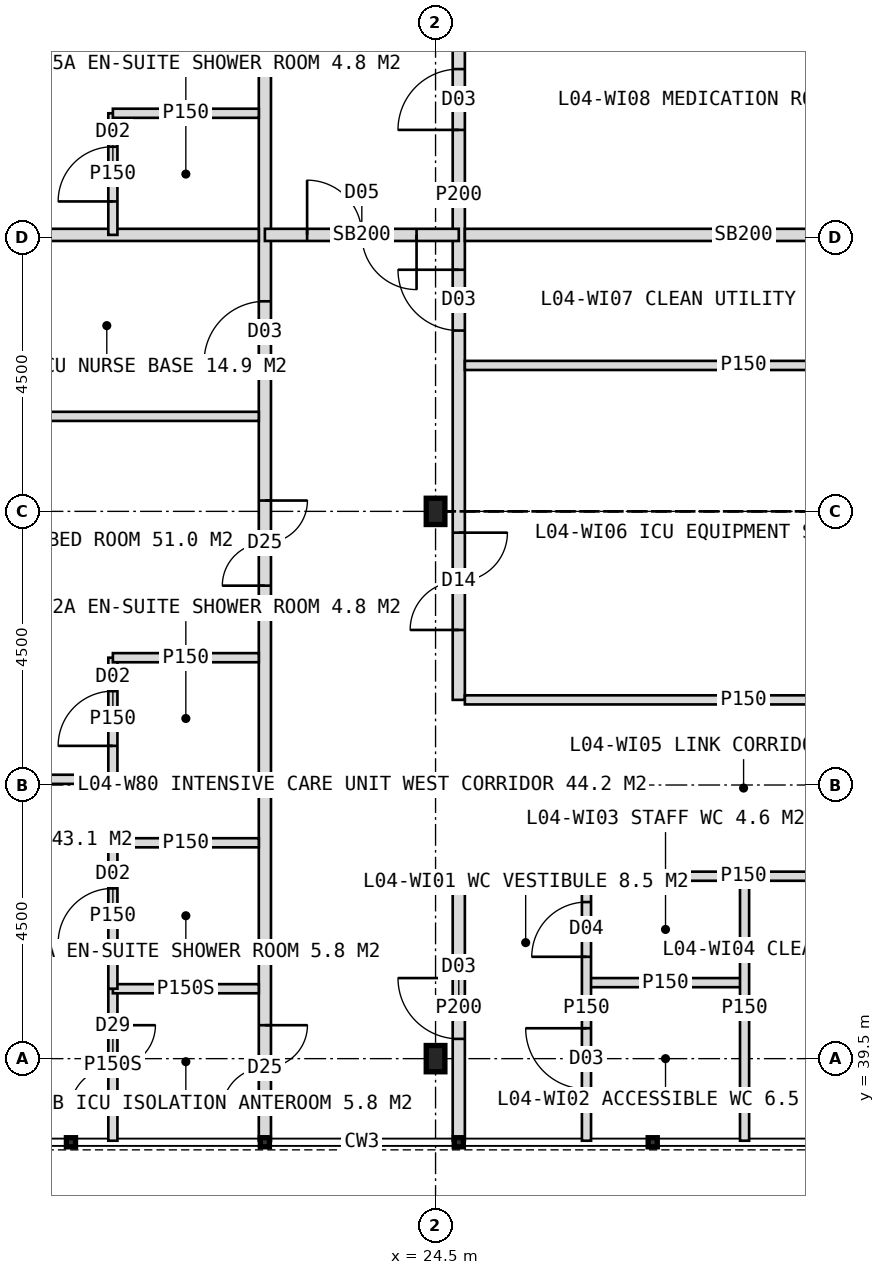
"""IFC4 building model, lengths in metres.
Left out: names, types, materials, properties, quantities, classifications, styles, units other than length and angle.
Written with IfcOpenShell. Run it as: python <this file> out.ifc"""

import sys

from ifc_helpers import new_model, si_unit, direction, frame, frame_2d, origin, origin_2d, place, context, subcontext, project, spatial, rectangle, i_section, extrude, element, fill, save


model = new_model("IFC4")
c1 = context("Model", 3, precision=1e-05, world=origin(), true_north=direction((0.0, 1.0)))
c2 = subcontext(c1, "Body", "Model", "MODEL_VIEW")
j1 = project(units=[si_unit("LENGTHUNIT", "METRE"), si_unit("PLANEANGLEUNIT", "RADIAN")], contexts=[c1])
p1 = place(None, origin())
s1 = spatial("IfcSite", under=j1, at=p1, CompositionType="ELEMENT")
p2 = place(p1, origin())
s2 = spatial("IfcBuilding", under=s1, at=p2, CompositionType="ELEMENT")
p3 = place(p2, frame((0.0, 0.0, 21.0)))
s3 = spatial("IfcBuildingStorey", under=s2, at=p3, CompositionType="ELEMENT", Elevation=21.0)
for number, where, z_axis, x_axis in (
    (1, (24.5, 39.5, 0.0), (0.0, 0.0, 1.0), (1.0, 0.0, 0.0)),
    (2, (24.5, 48.5, 0.0), (0.0, 0.0, 1.0), (1.0, 0.0, 0.0)),
):
    element("IfcColumn", number, at=place(p3, frame(where, z_axis=z_axis, x_axis=x_axis)), inside=s3, PredefinedType="COLUMN", context=c2, shape_type="SweptSolid", body=[
        extrude(i_section(OverallWidth=0.307, OverallDepth=0.432, WebThickness=0.021, FlangeThickness=0.04, FilletRadius=0.027, at=origin_2d()), origin(), (0.0, 0.0, 1.0), 5.0),
    ])
p4 = place(p3, frame((21.693, 38.15, 0.0), z_axis=(0.0, 0.0, 1.0), x_axis=(0.0, 1.0, 0.0)))
e3 = element("IfcWall", 3, at=p4, inside=s3, PredefinedType="PARTITIONING", context=c2, shape_type="SweptSolid", body=[
    extrude(rectangle(XDim=47.7, YDim=0.2, at=frame_2d((23.85, 0.0))), origin(), (0.0, 0.0, 1.0), 4.7),
])
p5 = place(p4, frame((45.7, 0.0, 0.0)))
e4 = element("IfcOpeningElement", 4, at=p5, cuts=e3, PredefinedType="OPENING", context=c2, shape_type="SweptSolid", body=[
    extrude(rectangle(XDim=1.2, YDim=2.1, at=frame_2d((0.6, 1.05))), frame((0.0, 0.11, 0.0), z_axis=(0.0, -1.0, 0.0), x_axis=(1.0, 0.0, 0.0)), (0.0, 0.0, 1.0), 0.22),
])
p6 = place(p4, frame((36.244, 0.0, 0.0)))
e5 = element("IfcOpeningElement", 5, at=p6, cuts=e3, PredefinedType="OPENING", context=c2, shape_type="SweptSolid", body=[
    extrude(rectangle(XDim=1.0, YDim=2.1, at=frame_2d((0.5, 1.05))), frame((0.0, 0.11, 0.0), z_axis=(0.0, -1.0, 0.0), x_axis=(1.0, 0.0, 0.0)), (0.0, 0.0, 1.0), 0.22),
])
p7 = place(p4, frame((0.5, 0.0, 0.0)))
e6 = element("IfcOpeningElement", 6, at=p7, cuts=e3, PredefinedType="OPENING", context=c2, shape_type="SweptSolid", body=[
    extrude(rectangle(XDim=1.4, YDim=2.2, at=frame_2d((0.7, 1.1))), frame((0.0, 0.11, 0.0), z_axis=(0.0, -1.0, 0.0), x_axis=(1.0, 0.0, 0.0)), (0.0, 0.0, 1.0), 0.22),
])
p8 = place(p4, frame((30.219, 0.0, 0.0)))
e7 = element("IfcOpeningElement", 7, at=p8, cuts=e3, PredefinedType="OPENING", context=c2, shape_type="SweptSolid", body=[
    extrude(rectangle(XDim=1.4, YDim=2.2, at=frame_2d((0.7, 1.1))), frame((0.0, 0.11, 0.0), z_axis=(0.0, -1.0, 0.0), x_axis=(1.0, 0.0, 0.0)), (0.0, 0.0, 1.0), 0.22),
])
p9 = place(p4, frame((9.128, 0.0, 0.0)))
e8 = element("IfcOpeningElement", 8, at=p9, cuts=e3, PredefinedType="OPENING", context=c2, shape_type="SweptSolid", body=[
    extrude(rectangle(XDim=1.4, YDim=2.2, at=frame_2d((0.7, 1.1))), frame((0.0, 0.11, 0.0), z_axis=(0.0, -1.0, 0.0), x_axis=(1.0, 0.0, 0.0)), (0.0, 0.0, 1.0), 0.22),
])
p10 = place(p4, frame((12.805, 0.0, 0.0)))
e9 = element("IfcOpeningElement", 9, at=p10, cuts=e3, PredefinedType="OPENING", context=c2, shape_type="SweptSolid", body=[
    extrude(rectangle(XDim=1.0, YDim=2.1, at=frame_2d((0.5, 1.05))), frame((0.0, 0.11, 0.0), z_axis=(0.0, -1.0, 0.0), x_axis=(1.0, 0.0, 0.0)), (0.0, 0.0, 1.0), 0.22),
])
p11 = place(p4, frame((18.081, 0.0, 0.0)))
e10 = element("IfcOpeningElement", 10, at=p11, cuts=e3, PredefinedType="OPENING", context=c2, shape_type="SweptSolid", body=[
    extrude(rectangle(XDim=1.4, YDim=2.2, at=frame_2d((0.7, 1.1))), frame((0.0, 0.11, 0.0), z_axis=(0.0, -1.0, 0.0), x_axis=(1.0, 0.0, 0.0)), (0.0, 0.0, 1.0), 0.22),
])
p12 = place(p4, frame((24.05, 0.0, 0.0)))
e11 = element("IfcOpeningElement", 11, at=p12, cuts=e3, PredefinedType="OPENING", context=c2, shape_type="SweptSolid", body=[
    extrude(rectangle(XDim=1.4, YDim=2.2, at=frame_2d((0.7, 1.1))), frame((0.0, 0.11, 0.0), z_axis=(0.0, -1.0, 0.0), x_axis=(1.0, 0.0, 0.0)), (0.0, 0.0, 1.0), 0.22),
])
p13 = place(p4, frame((27.727, 0.0, 0.0)))
e12 = element("IfcOpeningElement", 12, at=p13, cuts=e3, PredefinedType="OPENING", context=c2, shape_type="SweptSolid", body=[
    extrude(rectangle(XDim=1.0, YDim=2.1, at=frame_2d((0.5, 1.05))), frame((0.0, 0.11, 0.0), z_axis=(0.0, -1.0, 0.0), x_axis=(1.0, 0.0, 0.0)), (0.0, 0.0, 1.0), 0.22),
])
p14 = place(p3, frame((24.882, 38.15, 0.0), z_axis=(0.0, 0.0, 1.0), x_axis=(0.0, 1.0, 0.0)))
e13 = element("IfcWall", 13, at=p14, inside=s3, PredefinedType="PARTITIONING", context=c2, shape_type="SweptSolid", body=[
    extrude(rectangle(XDim=4.35, YDim=0.2, at=frame_2d((2.175, 0.0))), origin(), (0.0, 0.0, 1.0), 4.7),
])
p15 = place(p14, frame((1.675, 0.0, 0.0)))
e14 = element("IfcOpeningElement", 14, at=p15, cuts=e13, PredefinedType="OPENING", context=c2, shape_type="SweptSolid", body=[
    extrude(rectangle(XDim=1.0, YDim=2.1, at=frame_2d((0.5, 1.05))), frame((0.0, 0.11, 0.0), z_axis=(0.0, -1.0, 0.0), x_axis=(1.0, 0.0, 0.0)), (0.0, 0.0, 1.0), 0.22),
])
p16 = place(p3, frame((24.882, 45.4, 0.0), z_axis=(0.0, 0.0, 1.0), x_axis=(0.0, 1.0, 0.0)))
e15 = element("IfcWall", 15, at=p16, inside=s3, PredefinedType="PARTITIONING", context=c2, shape_type="SweptSolid", body=[
    extrude(rectangle(XDim=16.6, YDim=0.2, at=frame_2d((8.3, 0.0))), origin(), (0.0, 0.0, 1.0), 4.7),
])
p17 = place(p16, frame((1.15, 0.0, 0.0)))
e16 = element("IfcOpeningElement", 16, at=p17, cuts=e15, PredefinedType="OPENING", context=c2, shape_type="SweptSolid", body=[
    extrude(rectangle(XDim=1.6, YDim=2.2, at=frame_2d((0.8, 1.1))), frame((0.0, 0.11, 0.0), z_axis=(0.0, -1.0, 0.0), x_axis=(1.0, 0.0, 0.0)), (0.0, 0.0, 1.0), 0.22),
])
p18 = place(p16, frame((6.073, 0.0, 0.0)))
e17 = element("IfcOpeningElement", 17, at=p18, cuts=e15, PredefinedType="OPENING", context=c2, shape_type="SweptSolid", body=[
    extrude(rectangle(XDim=1.0, YDim=2.1, at=frame_2d((0.5, 1.05))), frame((0.0, 0.11, 0.0), z_axis=(0.0, -1.0, 0.0), x_axis=(1.0, 0.0, 0.0)), (0.0, 0.0, 1.0), 0.22),
])
p19 = place(p16, frame((9.374, 0.0, 0.0)))
e18 = element("IfcOpeningElement", 18, at=p19, cuts=e15, PredefinedType="OPENING", context=c2, shape_type="SweptSolid", body=[
    extrude(rectangle(XDim=1.0, YDim=2.1, at=frame_2d((0.5, 1.05))), frame((0.0, 0.11, 0.0), z_axis=(0.0, -1.0, 0.0), x_axis=(1.0, 0.0, 0.0)), (0.0, 0.0, 1.0), 0.22),
])
p20 = place(p16, frame((13.85, 0.0, 0.0)))
e19 = element("IfcOpeningElement", 19, at=p20, cuts=e15, PredefinedType="OPENING", context=c2, shape_type="SweptSolid", body=[
    extrude(rectangle(XDim=1.0, YDim=2.1, at=frame_2d((0.5, 1.05))), frame((0.0, 0.11, 0.0), z_axis=(0.0, -1.0, 0.0), x_axis=(1.0, 0.0, 0.0)), (0.0, 0.0, 1.0), 0.22),
])
p21 = place(p3, frame((21.693, 53.047, 0.0), z_axis=(0.0, 0.0, 1.0), x_axis=(1.0, 0.0, 0.0)))
e20 = element("IfcWall", 20, at=p21, inside=s3, PredefinedType="SOLIDWALL", context=c2, shape_type="SweptSolid", body=[
    extrude(rectangle(XDim=3.189, YDim=0.2, at=frame_2d((1.594, 0.0))), origin(), (0.0, 0.0, 1.0), 4.7),
])
p22 = place(p21, frame((0.695, 0.0, 0.0)))
e21 = element("IfcOpeningElement", 21, at=p22, cuts=e20, PredefinedType="OPENING", context=c2, shape_type="SweptSolid", body=[
    extrude(rectangle(XDim=1.8, YDim=2.2, at=frame_2d((0.9, 1.1))), frame((0.0, 0.11, 0.0), z_axis=(0.0, -1.0, 0.0), x_axis=(1.0, 0.0, 0.0)), (0.0, 0.0, 1.0), 0.22),
])
for number, where, z_axis, x_axis in (
    (22, (12.15, 44.094, 0.0), (0.0, 0.0, 1.0), (1.0, 0.0, 0.0)),
    (23, (12.15, 50.062, 0.0), (0.0, 0.0, 1.0), (1.0, 0.0, 0.0)),
):
    element("IfcWall", number, at=place(p3, frame(where, z_axis=z_axis, x_axis=x_axis)), inside=s3, PredefinedType="PARTITIONING", context=c2, shape_type="SweptSolid", body=[
        extrude(rectangle(XDim=9.443, YDim=0.15, at=frame_2d((4.722, 0.0))), origin(), (0.0, 0.0, 1.0), 4.7),
    ])
p23 = place(p3, frame((12.15, 53.047, 0.0), z_axis=(0.0, 0.0, 1.0), x_axis=(1.0, 0.0, 0.0)))
e24 = element("IfcWall", 24, at=p23, inside=s3, PredefinedType="SOLIDWALL", context=c2, shape_type="SweptSolid", body=[
    extrude(rectangle(XDim=9.443, YDim=0.2, at=frame_2d((4.722, 0.0))), origin(), (0.0, 0.0, 1.0), 4.7),
])
p24 = place(p3, frame((19.193, 38.15, 0.0), z_axis=(0.0, 0.0, 1.0), x_axis=(0.0, 1.0, 0.0)))
e25 = element("IfcWall", 25, at=p24, inside=s3, PredefinedType="PARTITIONING", context=c2, shape_type="SweptSolid", body=[
    extrude(rectangle(XDim=2.5, YDim=0.15, at=frame_2d((1.25, 0.0))), origin(), (0.0, 0.0, 1.0), 4.7),
])
p25 = place(p24, frame((0.5, 0.0, 0.0)))
e26 = element("IfcOpeningElement", 26, at=p25, cuts=e25, PredefinedType="OPENING", context=c2, shape_type="SweptSolid", body=[
    extrude(rectangle(XDim=1.4, YDim=2.2, at=frame_2d((0.7, 1.1))), frame((0.0, 0.085, 0.0), z_axis=(0.0, -1.0, 0.0), x_axis=(1.0, 0.0, 0.0)), (0.0, 0.0, 1.0), 0.17),
])
p26 = place(p3, frame((21.593, 40.65, 0.0), z_axis=(0.0, 0.0, 1.0), x_axis=(-1.0, 0.0, 0.0)))
e27 = element("IfcWall", 27, at=p26, inside=s3, PredefinedType="PARTITIONING", context=c2, shape_type="SweptSolid", body=[
    extrude(rectangle(XDim=2.4, YDim=0.15, at=frame_2d((1.2, 0.0))), origin(), (0.0, 0.0, 1.0), 4.7),
])
p27 = place(p3, frame((19.193, 40.65, 0.0), z_axis=(0.0, 0.0, 1.0), x_axis=(0.0, 1.0, 0.0)))
e28 = element("IfcWall", 28, at=p27, inside=s3, PredefinedType="PARTITIONING", context=c2, shape_type="SweptSolid", body=[
    extrude(rectangle(XDim=2.4, YDim=0.15, at=frame_2d((1.2, 0.0))), origin(), (0.0, 0.0, 1.0), 4.7),
])
p28 = place(p27, frame((0.75, 0.0, 0.0)))
e29 = element("IfcOpeningElement", 29, at=p28, cuts=e28, PredefinedType="OPENING", context=c2, shape_type="SweptSolid", body=[
    extrude(rectangle(XDim=0.9, YDim=2.1, at=frame_2d((0.45, 1.05))), frame((0.0, 0.085, 0.0), z_axis=(0.0, -1.0, 0.0), x_axis=(1.0, 0.0, 0.0)), (0.0, 0.0, 1.0), 0.17),
])
p29 = place(p3, frame((21.593, 43.05, 0.0), z_axis=(0.0, 0.0, 1.0), x_axis=(-1.0, 0.0, 0.0)))
e30 = element("IfcWall", 30, at=p29, inside=s3, PredefinedType="PARTITIONING", context=c2, shape_type="SweptSolid", body=[
    extrude(rectangle(XDim=2.4, YDim=0.15, at=frame_2d((1.2, 0.0))), origin(), (0.0, 0.0, 1.0), 4.7),
])
p30 = place(p3, frame((19.193, 44.094, 0.0), z_axis=(0.0, 0.0, 1.0), x_axis=(0.0, 1.0, 0.0)))
e31 = element("IfcWall", 31, at=p30, inside=s3, PredefinedType="PARTITIONING", context=c2, shape_type="SweptSolid", body=[
    extrude(rectangle(XDim=2.0, YDim=0.15, at=frame_2d((1.0, 0.0))), origin(), (0.0, 0.0, 1.0), 4.7),
])
p31 = place(p30, frame((0.55, 0.0, 0.0)))
e32 = element("IfcOpeningElement", 32, at=p31, cuts=e31, PredefinedType="OPENING", context=c2, shape_type="SweptSolid", body=[
    extrude(rectangle(XDim=0.9, YDim=2.1, at=frame_2d((0.45, 1.05))), frame((0.0, 0.085, 0.0), z_axis=(0.0, -1.0, 0.0), x_axis=(1.0, 0.0, 0.0)), (0.0, 0.0, 1.0), 0.17),
])
p32 = place(p3, frame((21.593, 46.094, 0.0), z_axis=(0.0, 0.0, 1.0), x_axis=(-1.0, 0.0, 0.0)))
e33 = element("IfcWall", 33, at=p32, inside=s3, PredefinedType="PARTITIONING", context=c2, shape_type="SweptSolid", body=[
    extrude(rectangle(XDim=2.4, YDim=0.15, at=frame_2d((1.2, 0.0))), origin(), (0.0, 0.0, 1.0), 4.7),
])
p33 = place(p3, frame((19.193, 53.047, 0.0), z_axis=(0.0, 0.0, 1.0), x_axis=(0.0, 1.0, 0.0)))
e34 = element("IfcWall", 34, at=p33, inside=s3, PredefinedType="PARTITIONING", context=c2, shape_type="SweptSolid", body=[
    extrude(rectangle(XDim=2.0, YDim=0.15, at=frame_2d((1.0, 0.0))), origin(), (0.0, 0.0, 1.0), 4.7),
])
p34 = place(p33, frame((0.55, 0.0, 0.0)))
e35 = element("IfcOpeningElement", 35, at=p34, cuts=e34, PredefinedType="OPENING", context=c2, shape_type="SweptSolid", body=[
    extrude(rectangle(XDim=0.9, YDim=2.1, at=frame_2d((0.45, 1.05))), frame((0.0, 0.085, 0.0), z_axis=(0.0, -1.0, 0.0), x_axis=(1.0, 0.0, 0.0)), (0.0, 0.0, 1.0), 0.17),
])
p35 = place(p3, frame((21.593, 55.047, 0.0), z_axis=(0.0, 0.0, 1.0), x_axis=(-1.0, 0.0, 0.0)))
e36 = element("IfcWall", 36, at=p35, inside=s3, PredefinedType="PARTITIONING", context=c2, shape_type="SweptSolid", body=[
    extrude(rectangle(XDim=2.4, YDim=0.15, at=frame_2d((1.2, 0.0))), origin(), (0.0, 0.0, 1.0), 4.7),
])
p36 = place(p3, frame((26.982, 40.75, 0.0), z_axis=(0.0, 0.0, 1.0), x_axis=(1.0, 0.0, 0.0)))
e37 = element("IfcWall", 37, at=p36, inside=s3, PredefinedType="PARTITIONING", context=c2, shape_type="SweptSolid", body=[
    extrude(rectangle(XDim=2.6, YDim=0.15, at=frame_2d((1.3, 0.0))), origin(), (0.0, 0.0, 1.0), 4.7),
])
p37 = place(p3, frame((24.982, 42.5, 0.0), z_axis=(0.0, 0.0, 1.0), x_axis=(1.0, 0.0, 0.0)))
e38 = element("IfcWall", 38, at=p37, inside=s3, PredefinedType="PARTITIONING", context=c2, shape_type="SweptSolid", body=[
    extrude(rectangle(XDim=9.168, YDim=0.15, at=frame_2d((4.584, 0.0))), origin(), (0.0, 0.0, 1.0), 4.7),
])
p38 = place(p37, frame((6.434, 0.0, 0.0)))
e39 = element("IfcOpeningElement", 39, at=p38, cuts=e38, PredefinedType="OPENING", context=c2, shape_type="SweptSolid", body=[
    extrude(rectangle(XDim=0.9, YDim=2.1, at=frame_2d((0.45, 1.05))), frame((0.0, 0.085, 0.0), z_axis=(0.0, -1.0, 0.0), x_axis=(1.0, 0.0, 0.0)), (0.0, 0.0, 1.0), 0.17),
])
for number, where, z_axis, x_axis in (
    (40, (24.982, 45.4, 0.0), (0.0, 0.0, 1.0), (1.0, 0.0, 0.0)),
    (41, (24.982, 50.9, 0.0), (0.0, 0.0, 1.0), (1.0, 0.0, 0.0)),
):
    element("IfcWall", number, at=place(p3, frame(where, z_axis=z_axis, x_axis=x_axis)), inside=s3, PredefinedType="PARTITIONING", context=c2, shape_type="SweptSolid", body=[
        extrude(rectangle(XDim=9.168, YDim=0.15, at=frame_2d((4.584, 0.0))), origin(), (0.0, 0.0, 1.0), 4.7),
    ])
p39 = place(p3, frame((24.982, 53.047, 0.0), z_axis=(0.0, 0.0, 1.0), x_axis=(1.0, 0.0, 0.0)))
e42 = element("IfcWall", 42, at=p39, inside=s3, PredefinedType="SOLIDWALL", context=c2, shape_type="SweptSolid", body=[
    extrude(rectangle(XDim=9.168, YDim=0.2, at=frame_2d((4.584, 0.0))), origin(), (0.0, 0.0, 1.0), 4.7),
])
p40 = place(p3, frame((26.982, 38.15, 0.0), z_axis=(0.0, 0.0, 1.0), x_axis=(0.0, 1.0, 0.0)))
e43 = element("IfcWall", 43, at=p40, inside=s3, PredefinedType="PARTITIONING", context=c2, shape_type="SweptSolid", body=[
    extrude(rectangle(XDim=4.35, YDim=0.15, at=frame_2d((2.175, 0.0))), origin(), (0.0, 0.0, 1.0), 4.7),
])
p41 = place(p40, frame((0.85, 0.0, 0.0)))
e44 = element("IfcOpeningElement", 44, at=p41, cuts=e43, PredefinedType="OPENING", context=c2, shape_type="SweptSolid", body=[
    extrude(rectangle(XDim=1.0, YDim=2.1, at=frame_2d((0.5, 1.05))), frame((0.0, 0.085, 0.0), z_axis=(0.0, -1.0, 0.0), x_axis=(1.0, 0.0, 0.0)), (0.0, 0.0, 1.0), 0.17),
])
p42 = place(p40, frame((3.025, 0.0, 0.0)))
e45 = element("IfcOpeningElement", 45, at=p42, cuts=e43, PredefinedType="OPENING", context=c2, shape_type="SweptSolid", body=[
    extrude(rectangle(XDim=0.9, YDim=2.1, at=frame_2d((0.45, 1.05))), frame((0.0, 0.085, 0.0), z_axis=(0.0, -1.0, 0.0), x_axis=(1.0, 0.0, 0.0)), (0.0, 0.0, 1.0), 0.17),
])
p43 = place(p3, frame((29.582, 38.15, 0.0), z_axis=(0.0, 0.0, 1.0), x_axis=(0.0, 1.0, 0.0)))
e46 = element("IfcWall", 46, at=p43, inside=s3, PredefinedType="PARTITIONING", context=c2, shape_type="SweptSolid", body=[
    extrude(rectangle(XDim=4.35, YDim=0.15, at=frame_2d((2.175, 0.0))), origin(), (0.0, 0.0, 1.0), 4.7),
])
p44 = place(p22, origin())
e47 = element("IfcDoor", 47, at=p44, inside=s3, OperationType="DOUBLE_DOOR_DOUBLE_SWING", PredefinedType="DOOR", context=c2, shape_type="SweptSolid", body=[
    extrude(rectangle(XDim=1.8, YDim=2.2, at=frame_2d((0.9, 1.1))), frame((0.0, 0.025, 0.0), z_axis=(0.0, -1.0, 0.0), x_axis=(1.0, 0.0, 0.0)), (0.0, 0.0, 1.0), 0.05),
])
fill(e21, e47)
p45 = place(p25, origin())
e48 = element("IfcDoor", 48, at=p45, inside=s3, OperationType="DOUBLE_DOOR_SINGLE_SWING", PredefinedType="DOOR", context=c2, shape_type="SweptSolid", body=[
    extrude(rectangle(XDim=1.4, YDim=2.2, at=frame_2d((0.7, 1.1))), frame((0.0, 0.025, 0.0), z_axis=(0.0, -1.0, 0.0), x_axis=(1.0, 0.0, 0.0)), (0.0, 0.0, 1.0), 0.05),
])
fill(e26, e48)
p46 = place(p7, origin())
e49 = element("IfcDoor", 49, at=p46, inside=s3, OperationType="DOUBLE_DOOR_SINGLE_SWING", PredefinedType="DOOR", context=c2, shape_type="SweptSolid", body=[
    extrude(rectangle(XDim=1.4, YDim=2.2, at=frame_2d((0.7, 1.1))), frame((0.0, 0.025, 0.0), z_axis=(0.0, -1.0, 0.0), x_axis=(1.0, 0.0, 0.0)), (0.0, 0.0, 1.0), 0.05),
])
fill(e6, e49)
p47 = place(p28, origin())
e50 = element("IfcDoor", 50, at=p47, inside=s3, OperationType="SINGLE_SWING_LEFT", PredefinedType="DOOR", context=c2, shape_type="SweptSolid", body=[
    extrude(rectangle(XDim=0.9, YDim=2.1, at=frame_2d((0.45, 1.05))), frame((0.0, 0.025, 0.0), z_axis=(0.0, -1.0, 0.0), x_axis=(1.0, 0.0, 0.0)), (0.0, 0.0, 1.0), 0.05),
])
fill(e29, e50)
p48 = place(p31, origin())
e51 = element("IfcDoor", 51, at=p48, inside=s3, OperationType="SINGLE_SWING_LEFT", PredefinedType="DOOR", context=c2, shape_type="SweptSolid", body=[
    extrude(rectangle(XDim=0.9, YDim=2.1, at=frame_2d((0.45, 1.05))), frame((0.0, 0.025, 0.0), z_axis=(0.0, -1.0, 0.0), x_axis=(1.0, 0.0, 0.0)), (0.0, 0.0, 1.0), 0.05),
])
fill(e32, e51)
p49 = place(p34, origin())
e52 = element("IfcDoor", 52, at=p49, inside=s3, OperationType="SINGLE_SWING_LEFT", PredefinedType="DOOR", context=c2, shape_type="SweptSolid", body=[
    extrude(rectangle(XDim=0.9, YDim=2.1, at=frame_2d((0.45, 1.05))), frame((0.0, 0.025, 0.0), z_axis=(0.0, -1.0, 0.0), x_axis=(1.0, 0.0, 0.0)), (0.0, 0.0, 1.0), 0.05),
])
fill(e35, e52)
p50 = place(p9, origin())
e53 = element("IfcDoor", 53, at=p50, inside=s3, OperationType="DOUBLE_DOOR_SINGLE_SWING", PredefinedType="DOOR", context=c2, shape_type="SweptSolid", body=[
    extrude(rectangle(XDim=1.4, YDim=2.2, at=frame_2d((0.7, 1.1))), frame((0.0, 0.025, 0.0), z_axis=(0.0, -1.0, 0.0), x_axis=(1.0, 0.0, 0.0)), (0.0, 0.0, 1.0), 0.05),
])
fill(e8, e53)
p51 = place(p10, origin())
e54 = element("IfcDoor", 54, at=p51, inside=s3, OperationType="SINGLE_SWING_LEFT", PredefinedType="DOOR", context=c2, shape_type="SweptSolid", body=[
    extrude(rectangle(XDim=1.0, YDim=2.1, at=frame_2d((0.5, 1.05))), frame((0.0, 0.025, 0.0), z_axis=(0.0, -1.0, 0.0), x_axis=(1.0, 0.0, 0.0)), (0.0, 0.0, 1.0), 0.05),
])
fill(e9, e54)
p52 = place(p15, origin())
e55 = element("IfcDoor", 55, at=p52, inside=s3, OperationType="SINGLE_SWING_RIGHT", PredefinedType="DOOR", context=c2, shape_type="SweptSolid", body=[
    extrude(rectangle(XDim=1.0, YDim=2.1, at=frame_2d((0.5, 1.05))), frame((0.0, 0.025, 0.0), z_axis=(0.0, -1.0, 0.0), x_axis=(1.0, 0.0, 0.0)), (0.0, 0.0, 1.0), 0.05),
])
fill(e14, e55)
p53 = place(p41, origin())
e56 = element("IfcDoor", 56, at=p53, inside=s3, OperationType="SINGLE_SWING_RIGHT", PredefinedType="DOOR", context=c2, shape_type="SweptSolid", body=[
    extrude(rectangle(XDim=1.0, YDim=2.1, at=frame_2d((0.5, 1.05))), frame((0.0, 0.025, 0.0), z_axis=(0.0, -1.0, 0.0), x_axis=(1.0, 0.0, 0.0)), (0.0, 0.0, 1.0), 0.05),
])
fill(e44, e56)
p54 = place(p42, origin())
e57 = element("IfcDoor", 57, at=p54, inside=s3, OperationType="SINGLE_SWING_LEFT", PredefinedType="DOOR", context=c2, shape_type="SweptSolid", body=[
    extrude(rectangle(XDim=0.9, YDim=2.1, at=frame_2d((0.45, 1.05))), frame((0.0, 0.025, 0.0), z_axis=(0.0, -1.0, 0.0), x_axis=(1.0, 0.0, 0.0)), (0.0, 0.0, 1.0), 0.05),
])
fill(e45, e57)
p55 = place(p17, origin())
e58 = element("IfcDoor", 58, at=p55, inside=s3, OperationType="DOUBLE_DOOR_DOUBLE_SWING", PredefinedType="DOOR", context=c2, shape_type="SweptSolid", body=[
    extrude(rectangle(XDim=1.6, YDim=2.2, at=frame_2d((0.8, 1.1))), frame((0.0, 0.025, 0.0), z_axis=(0.0, -1.0, 0.0), x_axis=(1.0, 0.0, 0.0)), (0.0, 0.0, 1.0), 0.05),
])
fill(e16, e58)
p56 = place(p18, origin())
e59 = element("IfcDoor", 59, at=p56, inside=s3, OperationType="SINGLE_SWING_RIGHT", PredefinedType="DOOR", context=c2, shape_type="SweptSolid", body=[
    extrude(rectangle(XDim=1.0, YDim=2.1, at=frame_2d((0.5, 1.05))), frame((0.0, 0.025, 0.0), z_axis=(0.0, -1.0, 0.0), x_axis=(1.0, 0.0, 0.0)), (0.0, 0.0, 1.0), 0.05),
])
fill(e17, e59)
p57 = place(p19, origin())
e60 = element("IfcDoor", 60, at=p57, inside=s3, OperationType="SINGLE_SWING_LEFT", PredefinedType="DOOR", context=c2, shape_type="SweptSolid", body=[
    extrude(rectangle(XDim=1.0, YDim=2.1, at=frame_2d((0.5, 1.05))), frame((0.0, 0.025, 0.0), z_axis=(0.0, -1.0, 0.0), x_axis=(1.0, 0.0, 0.0)), (0.0, 0.0, 1.0), 0.05),
])
fill(e18, e60)
save(model, sys.argv[1])
